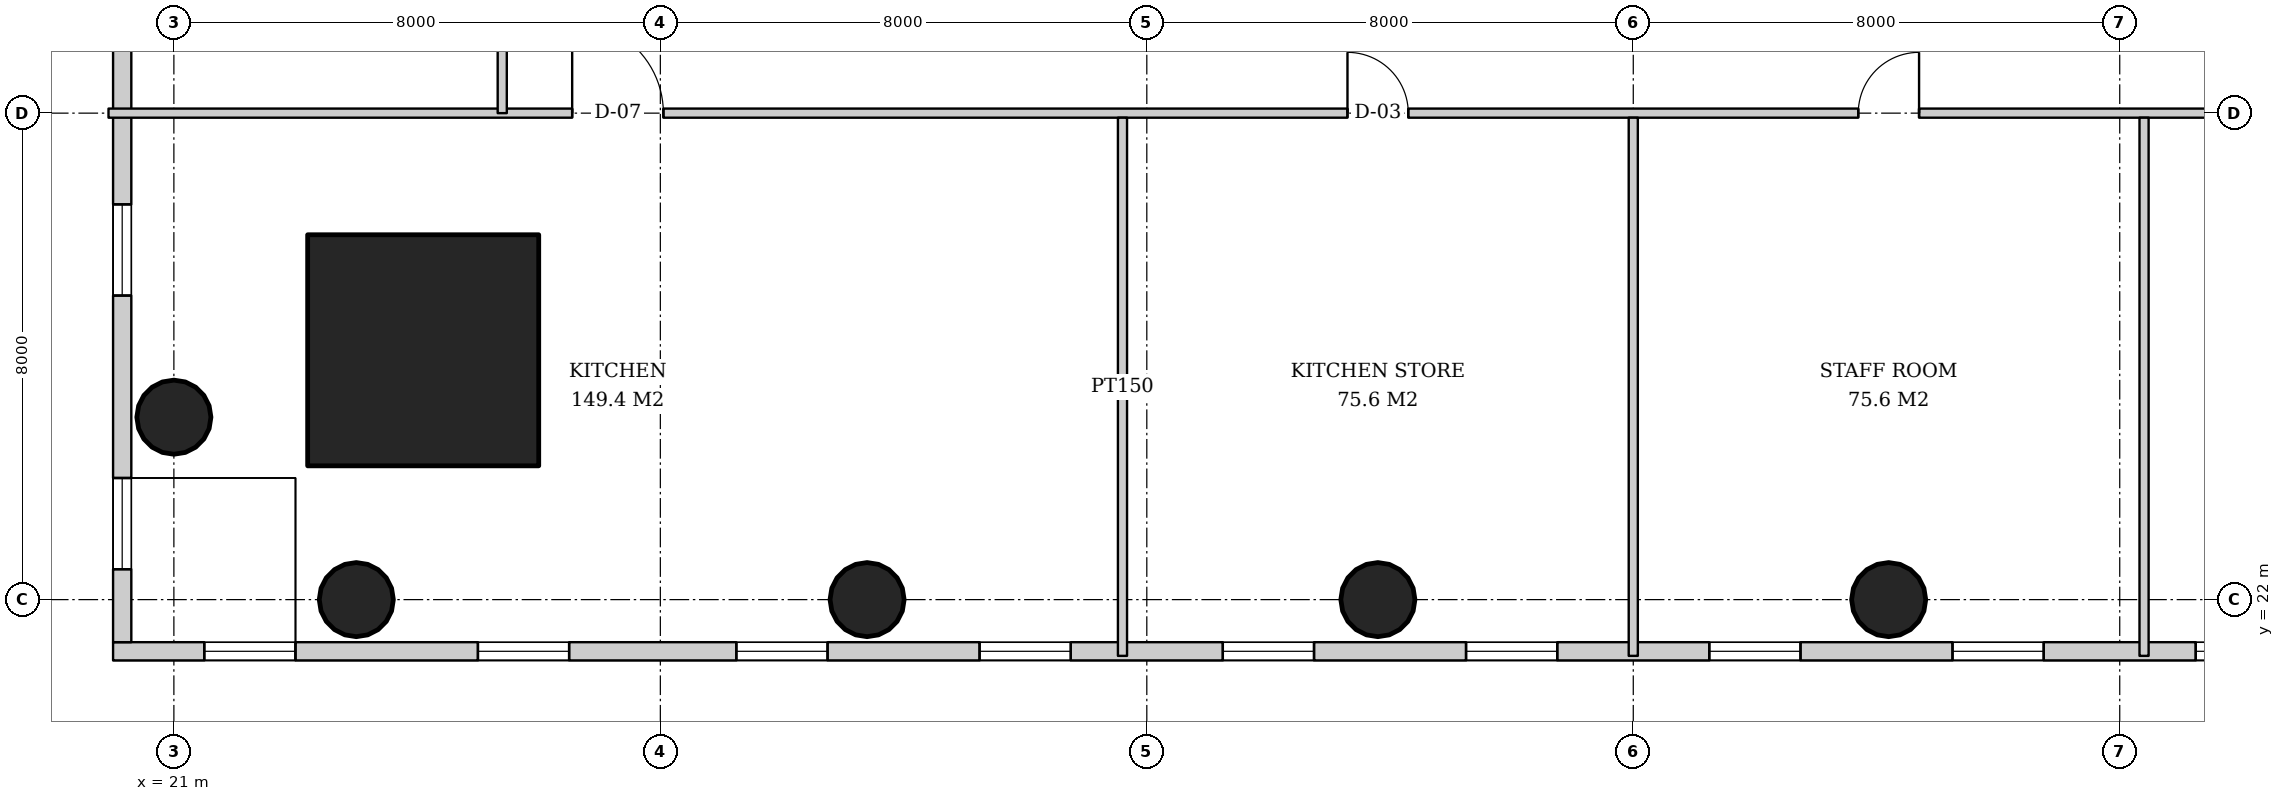
"""IFC4 building model, lengths in metres.
Left out: names, types, materials, properties, quantities, classifications, styles, units other than length and angle.
Written with IfcOpenShell. Run it as: python <this file> out.ifc"""

import sys

from ifc_helpers import new_model, si_unit, direction, frame, frame_2d, origin, origin_2d, place, context, subcontext, project, spatial, rectangle, hollow_circle, extrude, element, fill, save


model = new_model("IFC4")
c1 = context("Model", 3, precision=1e-05, world=origin(), true_north=direction((0.0, 1.0)))
c2 = subcontext(c1, "Body", "Model", "MODEL_VIEW")
j1 = project(units=[si_unit("LENGTHUNIT", "METRE"), si_unit("PLANEANGLEUNIT", "RADIAN")], contexts=[c1])
p1 = place(None, origin())
s1 = spatial("IfcSite", under=j1, at=p1, CompositionType="ELEMENT")
p2 = place(p1, origin())
s2 = spatial("IfcBuilding", under=s1, at=p2, CompositionType="ELEMENT")
p3 = place(p2, frame((0.0, 0.0, 16.0)))
s3 = spatial("IfcBuildingStorey", under=s2, at=p3, CompositionType="ELEMENT", Elevation=16.0)
p4 = place(p3, frame((25.1, 26.1, 0.0), z_axis=(0.0, 0.0, 1.0), x_axis=(1.0, 0.0, 0.0)))
e1 = element("IfcColumn", 1, at=p4, inside=s3, PredefinedType="COLUMN", context=c2, shape_type="SweptSolid", body=[
    extrude(rectangle(XDim=3.8, YDim=3.8, at=origin_2d()), origin(), (0.0, 0.0, 1.0), 5.0),
])
for number, where, z_axis, x_axis in (
    (2, (21.0, 25.0, 0.0), (0.0, 0.0, 1.0), (1.0, 0.0, 0.0)),
    (3, (24.0, 22.0, 0.0), (0.0, 0.0, 1.0), (1.0, 0.0, 0.0)),
    (4, (32.4, 22.0, 0.0), (0.0, 0.0, 1.0), (1.0, 0.0, 0.0)),
    (5, (40.8, 22.0, 0.0), (0.0, 0.0, 1.0), (1.0, 0.0, 0.0)),
    (6, (49.2, 22.0, 0.0), (0.0, 0.0, 1.0), (1.0, 0.0, 0.0)),
):
    element("IfcColumn", number, at=place(p3, frame(where, z_axis=z_axis, x_axis=x_axis)), inside=s3, PredefinedType="COLUMN", context=c2, shape_type="SweptSolid", body=[
        extrude(hollow_circle(Radius=0.61, WallThickness=0.04, at=origin_2d()), origin(), (0.0, 0.0, 1.0), 5.0),
    ])
p5 = place(p3, frame((20.0, 21.15, 0.0), z_axis=(0.0, 0.0, 1.0), x_axis=(1.0, 0.0, 0.0)))
e7 = element("IfcWall", 7, at=p5, inside=s3, PredefinedType="SOLIDWALL", context=c2, shape_type="SweptSolid", body=[
    extrude(rectangle(XDim=58.0, YDim=0.3, at=frame_2d((29.0, 0.0))), origin(), (0.0, 0.0, 1.0), 4.7),
])
p6 = place(p5, frame((1.5, 0.0, 0.9)))
e8 = element("IfcOpeningElement", 8, at=p6, cuts=e7, PredefinedType="OPENING", context=c2, shape_type="SweptSolid", body=[
    extrude(rectangle(XDim=1.5, YDim=3.2, at=frame_2d((0.75, 1.6))), frame((0.0, 0.16, 0.0), z_axis=(0.0, -1.0, 0.0), x_axis=(1.0, 0.0, 0.0)), (0.0, 0.0, 1.0), 0.32),
])
p7 = place(p5, frame((6.0, 0.0, 0.9)))
e9 = element("IfcOpeningElement", 9, at=p7, cuts=e7, PredefinedType="OPENING", context=c2, shape_type="SweptSolid", body=[
    extrude(rectangle(XDim=1.5, YDim=3.2, at=frame_2d((0.75, 1.6))), frame((0.0, 0.16, 0.0), z_axis=(0.0, -1.0, 0.0), x_axis=(1.0, 0.0, 0.0)), (0.0, 0.0, 1.0), 0.32),
])
p8 = place(p5, frame((10.25, 0.0, 0.9)))
e10 = element("IfcOpeningElement", 10, at=p8, cuts=e7, PredefinedType="OPENING", context=c2, shape_type="SweptSolid", body=[
    extrude(rectangle(XDim=1.5, YDim=3.2, at=frame_2d((0.75, 1.6))), frame((0.0, 0.16, 0.0), z_axis=(0.0, -1.0, 0.0), x_axis=(1.0, 0.0, 0.0)), (0.0, 0.0, 1.0), 0.32),
])
p9 = place(p5, frame((14.25, 0.0, 0.9)))
e11 = element("IfcOpeningElement", 11, at=p9, cuts=e7, PredefinedType="OPENING", context=c2, shape_type="SweptSolid", body=[
    extrude(rectangle(XDim=1.5, YDim=3.2, at=frame_2d((0.75, 1.6))), frame((0.0, 0.16, 0.0), z_axis=(0.0, -1.0, 0.0), x_axis=(1.0, 0.0, 0.0)), (0.0, 0.0, 1.0), 0.32),
])
p10 = place(p5, frame((18.25, 0.0, 0.9)))
e12 = element("IfcOpeningElement", 12, at=p10, cuts=e7, PredefinedType="OPENING", context=c2, shape_type="SweptSolid", body=[
    extrude(rectangle(XDim=1.5, YDim=3.2, at=frame_2d((0.75, 1.6))), frame((0.0, 0.16, 0.0), z_axis=(0.0, -1.0, 0.0), x_axis=(1.0, 0.0, 0.0)), (0.0, 0.0, 1.0), 0.32),
])
p11 = place(p5, frame((22.25, 0.0, 0.9)))
e13 = element("IfcOpeningElement", 13, at=p11, cuts=e7, PredefinedType="OPENING", context=c2, shape_type="SweptSolid", body=[
    extrude(rectangle(XDim=1.5, YDim=3.2, at=frame_2d((0.75, 1.6))), frame((0.0, 0.16, 0.0), z_axis=(0.0, -1.0, 0.0), x_axis=(1.0, 0.0, 0.0)), (0.0, 0.0, 1.0), 0.32),
])
p12 = place(p5, frame((26.25, 0.0, 0.9)))
e14 = element("IfcOpeningElement", 14, at=p12, cuts=e7, PredefinedType="OPENING", context=c2, shape_type="SweptSolid", body=[
    extrude(rectangle(XDim=1.5, YDim=3.2, at=frame_2d((0.75, 1.6))), frame((0.0, 0.16, 0.0), z_axis=(0.0, -1.0, 0.0), x_axis=(1.0, 0.0, 0.0)), (0.0, 0.0, 1.0), 0.32),
])
p13 = place(p5, frame((30.25, 0.0, 0.9)))
e15 = element("IfcOpeningElement", 15, at=p13, cuts=e7, PredefinedType="OPENING", context=c2, shape_type="SweptSolid", body=[
    extrude(rectangle(XDim=1.5, YDim=3.2, at=frame_2d((0.75, 1.6))), frame((0.0, 0.16, 0.0), z_axis=(0.0, -1.0, 0.0), x_axis=(1.0, 0.0, 0.0)), (0.0, 0.0, 1.0), 0.32),
])
p14 = place(p5, frame((34.25, 0.0, 0.9)))
e16 = element("IfcOpeningElement", 16, at=p14, cuts=e7, PredefinedType="OPENING", context=c2, shape_type="SweptSolid", body=[
    extrude(rectangle(XDim=1.5, YDim=3.2, at=frame_2d((0.75, 1.6))), frame((0.0, 0.16, 0.0), z_axis=(0.0, -1.0, 0.0), x_axis=(1.0, 0.0, 0.0)), (0.0, 0.0, 1.0), 0.32),
])
p15 = place(p5, frame((38.25, 0.0, 0.9)))
e17 = element("IfcOpeningElement", 17, at=p15, cuts=e7, PredefinedType="OPENING", context=c2, shape_type="SweptSolid", body=[
    extrude(rectangle(XDim=1.5, YDim=3.2, at=frame_2d((0.75, 1.6))), frame((0.0, 0.16, 0.0), z_axis=(0.0, -1.0, 0.0), x_axis=(1.0, 0.0, 0.0)), (0.0, 0.0, 1.0), 0.32),
])
p16 = place(p5, frame((42.25, 0.0, 0.9)))
e18 = element("IfcOpeningElement", 18, at=p16, cuts=e7, PredefinedType="OPENING", context=c2, shape_type="SweptSolid", body=[
    extrude(rectangle(XDim=1.5, YDim=3.2, at=frame_2d((0.75, 1.6))), frame((0.0, 0.16, 0.0), z_axis=(0.0, -1.0, 0.0), x_axis=(1.0, 0.0, 0.0)), (0.0, 0.0, 1.0), 0.32),
])
p17 = place(p5, frame((46.25, 0.0, 0.9)))
e19 = element("IfcOpeningElement", 19, at=p17, cuts=e7, PredefinedType="OPENING", context=c2, shape_type="SweptSolid", body=[
    extrude(rectangle(XDim=1.5, YDim=3.2, at=frame_2d((0.75, 1.6))), frame((0.0, 0.16, 0.0), z_axis=(0.0, -1.0, 0.0), x_axis=(1.0, 0.0, 0.0)), (0.0, 0.0, 1.0), 0.32),
])
p18 = place(p5, frame((50.5, 0.0, 0.9)))
e20 = element("IfcOpeningElement", 20, at=p18, cuts=e7, PredefinedType="OPENING", context=c2, shape_type="SweptSolid", body=[
    extrude(rectangle(XDim=1.5, YDim=3.2, at=frame_2d((0.75, 1.6))), frame((0.0, 0.16, 0.0), z_axis=(0.0, -1.0, 0.0), x_axis=(1.0, 0.0, 0.0)), (0.0, 0.0, 1.0), 0.32),
])
p19 = place(p5, frame((55.0, 0.0, 0.9)))
e21 = element("IfcOpeningElement", 21, at=p19, cuts=e7, PredefinedType="OPENING", context=c2, shape_type="SweptSolid", body=[
    extrude(rectangle(XDim=1.5, YDim=3.2, at=frame_2d((0.75, 1.6))), frame((0.0, 0.16, 0.0), z_axis=(0.0, -1.0, 0.0), x_axis=(1.0, 0.0, 0.0)), (0.0, 0.0, 1.0), 0.32),
])
p20 = place(p3, frame((20.15, 70.7, 0.0), z_axis=(0.0, 0.0, 1.0), x_axis=(0.0, -1.0, 0.0)))
e22 = element("IfcWall", 22, at=p20, inside=s3, PredefinedType="SOLIDWALL", context=c2, shape_type="SweptSolid", body=[
    extrude(rectangle(XDim=49.4, YDim=0.3, at=frame_2d((24.7, 0.0))), origin(), (0.0, 0.0, 1.0), 4.7),
])
p21 = place(p20, frame((1.2, 0.0, 0.9)))
e23 = element("IfcOpeningElement", 23, at=p21, cuts=e22, PredefinedType="OPENING", context=c2, shape_type="SweptSolid", body=[
    extrude(rectangle(XDim=1.5, YDim=3.2, at=frame_2d((0.75, 1.6))), frame((0.0, 0.16, 0.0), z_axis=(0.0, -1.0, 0.0), x_axis=(1.0, 0.0, 0.0)), (0.0, 0.0, 1.0), 0.32),
])
p22 = place(p20, frame((5.7, 0.0, 0.9)))
e24 = element("IfcOpeningElement", 24, at=p22, cuts=e22, PredefinedType="OPENING", context=c2, shape_type="SweptSolid", body=[
    extrude(rectangle(XDim=1.5, YDim=3.2, at=frame_2d((0.75, 1.6))), frame((0.0, 0.16, 0.0), z_axis=(0.0, -1.0, 0.0), x_axis=(1.0, 0.0, 0.0)), (0.0, 0.0, 1.0), 0.32),
])
p23 = place(p20, frame((9.95, 0.0, 0.9)))
e25 = element("IfcOpeningElement", 25, at=p23, cuts=e22, PredefinedType="OPENING", context=c2, shape_type="SweptSolid", body=[
    extrude(rectangle(XDim=1.5, YDim=3.2, at=frame_2d((0.75, 1.6))), frame((0.0, 0.16, 0.0), z_axis=(0.0, -1.0, 0.0), x_axis=(1.0, 0.0, 0.0)), (0.0, 0.0, 1.0), 0.32),
])
p24 = place(p20, frame((13.95, 0.0, 0.9)))
e26 = element("IfcOpeningElement", 26, at=p24, cuts=e22, PredefinedType="OPENING", context=c2, shape_type="SweptSolid", body=[
    extrude(rectangle(XDim=1.5, YDim=3.2, at=frame_2d((0.75, 1.6))), frame((0.0, 0.16, 0.0), z_axis=(0.0, -1.0, 0.0), x_axis=(1.0, 0.0, 0.0)), (0.0, 0.0, 1.0), 0.32),
])
p25 = place(p20, frame((17.95, 0.0, 0.9)))
e27 = element("IfcOpeningElement", 27, at=p25, cuts=e22, PredefinedType="OPENING", context=c2, shape_type="SweptSolid", body=[
    extrude(rectangle(XDim=1.5, YDim=3.2, at=frame_2d((0.75, 1.6))), frame((0.0, 0.16, 0.0), z_axis=(0.0, -1.0, 0.0), x_axis=(1.0, 0.0, 0.0)), (0.0, 0.0, 1.0), 0.32),
])
p26 = place(p20, frame((21.95, 0.0, 0.9)))
e28 = element("IfcOpeningElement", 28, at=p26, cuts=e22, PredefinedType="OPENING", context=c2, shape_type="SweptSolid", body=[
    extrude(rectangle(XDim=1.5, YDim=3.2, at=frame_2d((0.75, 1.6))), frame((0.0, 0.16, 0.0), z_axis=(0.0, -1.0, 0.0), x_axis=(1.0, 0.0, 0.0)), (0.0, 0.0, 1.0), 0.32),
])
p27 = place(p20, frame((25.95, 0.0, 0.9)))
e29 = element("IfcOpeningElement", 29, at=p27, cuts=e22, PredefinedType="OPENING", context=c2, shape_type="SweptSolid", body=[
    extrude(rectangle(XDim=1.5, YDim=3.2, at=frame_2d((0.75, 1.6))), frame((0.0, 0.16, 0.0), z_axis=(0.0, -1.0, 0.0), x_axis=(1.0, 0.0, 0.0)), (0.0, 0.0, 1.0), 0.32),
])
p28 = place(p20, frame((29.95, 0.0, 0.9)))
e30 = element("IfcOpeningElement", 30, at=p28, cuts=e22, PredefinedType="OPENING", context=c2, shape_type="SweptSolid", body=[
    extrude(rectangle(XDim=1.5, YDim=3.2, at=frame_2d((0.75, 1.6))), frame((0.0, 0.16, 0.0), z_axis=(0.0, -1.0, 0.0), x_axis=(1.0, 0.0, 0.0)), (0.0, 0.0, 1.0), 0.32),
])
p29 = place(p20, frame((33.95, 0.0, 0.9)))
e31 = element("IfcOpeningElement", 31, at=p29, cuts=e22, PredefinedType="OPENING", context=c2, shape_type="SweptSolid", body=[
    extrude(rectangle(XDim=1.5, YDim=3.2, at=frame_2d((0.75, 1.6))), frame((0.0, 0.16, 0.0), z_axis=(0.0, -1.0, 0.0), x_axis=(1.0, 0.0, 0.0)), (0.0, 0.0, 1.0), 0.32),
])
p30 = place(p20, frame((37.95, 0.0, 0.9)))
e32 = element("IfcOpeningElement", 32, at=p30, cuts=e22, PredefinedType="OPENING", context=c2, shape_type="SweptSolid", body=[
    extrude(rectangle(XDim=1.5, YDim=3.2, at=frame_2d((0.75, 1.6))), frame((0.0, 0.16, 0.0), z_axis=(0.0, -1.0, 0.0), x_axis=(1.0, 0.0, 0.0)), (0.0, 0.0, 1.0), 0.32),
])
p31 = place(p20, frame((42.2, 0.0, 0.9)))
e33 = element("IfcOpeningElement", 33, at=p31, cuts=e22, PredefinedType="OPENING", context=c2, shape_type="SweptSolid", body=[
    extrude(rectangle(XDim=1.5, YDim=3.2, at=frame_2d((0.75, 1.6))), frame((0.0, 0.16, 0.0), z_axis=(0.0, -1.0, 0.0), x_axis=(1.0, 0.0, 0.0)), (0.0, 0.0, 1.0), 0.32),
])
p32 = place(p20, frame((46.7, 0.0, 0.9)))
e34 = element("IfcOpeningElement", 34, at=p32, cuts=e22, PredefinedType="OPENING", context=c2, shape_type="SweptSolid", body=[
    extrude(rectangle(XDim=1.5, YDim=3.2, at=frame_2d((0.75, 1.6))), frame((0.0, 0.16, 0.0), z_axis=(0.0, -1.0, 0.0), x_axis=(1.0, 0.0, 0.0)), (0.0, 0.0, 1.0), 0.32),
])
p33 = place(p3, frame((19.925, 30.0, 0.0), z_axis=(0.0, 0.0, 1.0), x_axis=(1.0, 0.0, 0.0)))
e35 = element("IfcWall", 35, at=p33, inside=s3, PredefinedType="PARTITIONING", context=c2, shape_type="SweptSolid", body=[
    extrude(rectangle(XDim=50.15, YDim=0.15, at=frame_2d((25.075, 0.0))), origin(), (0.0, 0.0, 1.0), 3.688),
])
p34 = place(p33, frame((7.625, 0.0, 0.0)))
e36 = element("IfcOpeningElement", 36, at=p34, cuts=e35, PredefinedType="OPENING", context=c2, shape_type="SweptSolid", body=[
    extrude(rectangle(XDim=1.5, YDim=2.1, at=frame_2d((0.75, 1.05))), frame((0.0, 0.085, 0.0), z_axis=(0.0, -1.0, 0.0), x_axis=(1.0, 0.0, 0.0)), (0.0, 0.0, 1.0), 0.17),
])
p35 = place(p33, frame((20.375, 0.0, 0.0)))
e37 = element("IfcOpeningElement", 37, at=p35, cuts=e35, PredefinedType="OPENING", context=c2, shape_type="SweptSolid", body=[
    extrude(rectangle(XDim=1.0, YDim=2.1, at=frame_2d((0.5, 1.05))), frame((0.0, 0.085, 0.0), z_axis=(0.0, -1.0, 0.0), x_axis=(1.0, 0.0, 0.0)), (0.0, 0.0, 1.0), 0.17),
])
p36 = place(p33, frame((28.775, 0.0, 0.0)))
e38 = element("IfcOpeningElement", 38, at=p36, cuts=e35, PredefinedType="OPENING", context=c2, shape_type="SweptSolid", body=[
    extrude(rectangle(XDim=1.0, YDim=2.1, at=frame_2d((0.5, 1.05))), frame((0.0, 0.085, 0.0), z_axis=(0.0, -1.0, 0.0), x_axis=(1.0, 0.0, 0.0)), (0.0, 0.0, 1.0), 0.17),
])
p37 = place(p33, frame((39.875, 0.0, 0.0)))
e39 = element("IfcOpeningElement", 39, at=p37, cuts=e35, PredefinedType="OPENING", context=c2, shape_type="SweptSolid", body=[
    extrude(rectangle(XDim=1.0, YDim=2.1, at=frame_2d((0.5, 1.05))), frame((0.0, 0.085, 0.0), z_axis=(0.0, -1.0, 0.0), x_axis=(1.0, 0.0, 0.0)), (0.0, 0.0, 1.0), 0.17),
])
for number, where, z_axis, x_axis in (
    (40, (36.6, 21.075, 0.0), (0.0, 0.0, 1.0), (0.0, 1.0, 0.0)),
    (41, (45.0, 21.075, 0.0), (0.0, 0.0, 1.0), (0.0, 1.0, 0.0)),
    (42, (53.4, 21.075, 0.0), (0.0, 0.0, 1.0), (0.0, 1.0, 0.0)),
):
    element("IfcWall", number, at=place(p3, frame(where, z_axis=z_axis, x_axis=x_axis)), inside=s3, PredefinedType="PARTITIONING", context=c2, shape_type="SweptSolid", body=[
        extrude(rectangle(XDim=8.85, YDim=0.15, at=frame_2d((4.425, 0.0))), origin(), (0.0, 0.0, 1.0), 4.1),
    ])
p38 = place(p3, frame((26.4, 30.0, 0.0), z_axis=(0.0, 0.0, 1.0), x_axis=(0.0, 1.0, 0.0)))
e43 = element("IfcWall", 43, at=p38, inside=s3, PredefinedType="PARTITIONING", context=c2, shape_type="SweptSolid", body=[
    extrude(rectangle(XDim=32.0, YDim=0.15, at=frame_2d((16.0, 0.0))), origin(), (0.0, 0.0, 1.0), 3.688),
])
p39 = place(p38, frame((7.5, 0.0, 0.0)))
e44 = element("IfcOpeningElement", 44, at=p39, cuts=e43, PredefinedType="OPENING", context=c2, shape_type="SweptSolid", body=[
    extrude(rectangle(XDim=1.0, YDim=2.1, at=frame_2d((0.5, 1.05))), frame((0.0, 0.085, 0.0), z_axis=(0.0, -1.0, 0.0), x_axis=(1.0, 0.0, 0.0)), (0.0, 0.0, 1.0), 0.17),
])
p40 = place(p38, frame((23.5, 0.0, 0.0)))
e45 = element("IfcOpeningElement", 45, at=p40, cuts=e43, PredefinedType="OPENING", context=c2, shape_type="SweptSolid", body=[
    extrude(rectangle(XDim=1.0, YDim=2.1, at=frame_2d((0.5, 1.05))), frame((0.0, 0.085, 0.0), z_axis=(0.0, -1.0, 0.0), x_axis=(1.0, 0.0, 0.0)), (0.0, 0.0, 1.0), 0.17),
])
p41 = place(p6, origin())
e46 = element("IfcWindow", 46, at=p41, inside=s3, PartitioningType="SINGLE_PANEL", PredefinedType="WINDOW", context=c2, shape_type="SweptSolid", body=[
    extrude(rectangle(XDim=1.5, YDim=3.2, at=frame_2d((0.75, 1.6))), frame((0.0, 0.03, 0.0), z_axis=(0.0, -1.0, 0.0), x_axis=(1.0, 0.0, 0.0)), (0.0, 0.0, 1.0), 0.06),
])
fill(e8, e46)
p42 = place(p7, origin())
e47 = element("IfcWindow", 47, at=p42, inside=s3, PartitioningType="SINGLE_PANEL", PredefinedType="WINDOW", context=c2, shape_type="SweptSolid", body=[
    extrude(rectangle(XDim=1.5, YDim=3.2, at=frame_2d((0.75, 1.6))), frame((0.0, 0.03, 0.0), z_axis=(0.0, -1.0, 0.0), x_axis=(1.0, 0.0, 0.0)), (0.0, 0.0, 1.0), 0.06),
])
fill(e9, e47)
p43 = place(p8, origin())
e48 = element("IfcWindow", 48, at=p43, inside=s3, PartitioningType="SINGLE_PANEL", PredefinedType="WINDOW", context=c2, shape_type="SweptSolid", body=[
    extrude(rectangle(XDim=1.5, YDim=3.2, at=frame_2d((0.75, 1.6))), frame((0.0, 0.03, 0.0), z_axis=(0.0, -1.0, 0.0), x_axis=(1.0, 0.0, 0.0)), (0.0, 0.0, 1.0), 0.06),
])
fill(e10, e48)
p44 = place(p9, origin())
e49 = element("IfcWindow", 49, at=p44, inside=s3, PartitioningType="SINGLE_PANEL", PredefinedType="WINDOW", context=c2, shape_type="SweptSolid", body=[
    extrude(rectangle(XDim=1.5, YDim=3.2, at=frame_2d((0.75, 1.6))), frame((0.0, 0.03, 0.0), z_axis=(0.0, -1.0, 0.0), x_axis=(1.0, 0.0, 0.0)), (0.0, 0.0, 1.0), 0.06),
])
fill(e11, e49)
p45 = place(p10, origin())
e50 = element("IfcWindow", 50, at=p45, inside=s3, PartitioningType="SINGLE_PANEL", PredefinedType="WINDOW", context=c2, shape_type="SweptSolid", body=[
    extrude(rectangle(XDim=1.5, YDim=3.2, at=frame_2d((0.75, 1.6))), frame((0.0, 0.03, 0.0), z_axis=(0.0, -1.0, 0.0), x_axis=(1.0, 0.0, 0.0)), (0.0, 0.0, 1.0), 0.06),
])
fill(e12, e50)
p46 = place(p11, origin())
e51 = element("IfcWindow", 51, at=p46, inside=s3, PartitioningType="SINGLE_PANEL", PredefinedType="WINDOW", context=c2, shape_type="SweptSolid", body=[
    extrude(rectangle(XDim=1.5, YDim=3.2, at=frame_2d((0.75, 1.6))), frame((0.0, 0.03, 0.0), z_axis=(0.0, -1.0, 0.0), x_axis=(1.0, 0.0, 0.0)), (0.0, 0.0, 1.0), 0.06),
])
fill(e13, e51)
p47 = place(p12, origin())
e52 = element("IfcWindow", 52, at=p47, inside=s3, PartitioningType="SINGLE_PANEL", PredefinedType="WINDOW", context=c2, shape_type="SweptSolid", body=[
    extrude(rectangle(XDim=1.5, YDim=3.2, at=frame_2d((0.75, 1.6))), frame((0.0, 0.03, 0.0), z_axis=(0.0, -1.0, 0.0), x_axis=(1.0, 0.0, 0.0)), (0.0, 0.0, 1.0), 0.06),
])
fill(e14, e52)
p48 = place(p13, origin())
e53 = element("IfcWindow", 53, at=p48, inside=s3, PartitioningType="SINGLE_PANEL", PredefinedType="WINDOW", context=c2, shape_type="SweptSolid", body=[
    extrude(rectangle(XDim=1.5, YDim=3.2, at=frame_2d((0.75, 1.6))), frame((0.0, 0.03, 0.0), z_axis=(0.0, -1.0, 0.0), x_axis=(1.0, 0.0, 0.0)), (0.0, 0.0, 1.0), 0.06),
])
fill(e15, e53)
p49 = place(p14, origin())
e54 = element("IfcWindow", 54, at=p49, inside=s3, PartitioningType="SINGLE_PANEL", PredefinedType="WINDOW", context=c2, shape_type="SweptSolid", body=[
    extrude(rectangle(XDim=1.5, YDim=3.2, at=frame_2d((0.75, 1.6))), frame((0.0, 0.03, 0.0), z_axis=(0.0, -1.0, 0.0), x_axis=(1.0, 0.0, 0.0)), (0.0, 0.0, 1.0), 0.06),
])
fill(e16, e54)
p50 = place(p31, origin())
e55 = element("IfcWindow", 55, at=p50, inside=s3, PartitioningType="SINGLE_PANEL", PredefinedType="WINDOW", context=c2, shape_type="SweptSolid", body=[
    extrude(rectangle(XDim=1.5, YDim=3.2, at=frame_2d((0.75, 1.6))), frame((0.0, 0.03, 0.0), z_axis=(0.0, -1.0, 0.0), x_axis=(1.0, 0.0, 0.0)), (0.0, 0.0, 1.0), 0.06),
])
fill(e33, e55)
p51 = place(p32, origin())
e56 = element("IfcWindow", 56, at=p51, inside=s3, PartitioningType="SINGLE_PANEL", PredefinedType="WINDOW", context=c2, shape_type="SweptSolid", body=[
    extrude(rectangle(XDim=1.5, YDim=3.2, at=frame_2d((0.75, 1.6))), frame((0.0, 0.03, 0.0), z_axis=(0.0, -1.0, 0.0), x_axis=(1.0, 0.0, 0.0)), (0.0, 0.0, 1.0), 0.06),
])
fill(e34, e56)
p52 = place(p34, origin())
e57 = element("IfcDoor", 57, at=p52, inside=s3, OperationType="DOUBLE_DOOR_DOUBLE_SWING", PredefinedType="DOOR", context=c2, shape_type="SweptSolid", body=[
    extrude(rectangle(XDim=1.5, YDim=2.1, at=frame_2d((0.75, 1.05))), frame((0.0, 0.025, 0.0), z_axis=(0.0, -1.0, 0.0), x_axis=(1.0, 0.0, 0.0)), (0.0, 0.0, 1.0), 0.05),
])
fill(e36, e57)
p53 = place(p35, origin())
e58 = element("IfcDoor", 58, at=p53, inside=s3, OperationType="SINGLE_SWING_LEFT", PredefinedType="DOOR", context=c2, shape_type="SweptSolid", body=[
    extrude(rectangle(XDim=1.0, YDim=2.1, at=frame_2d((0.5, 1.05))), frame((0.0, 0.025, 0.0), z_axis=(0.0, -1.0, 0.0), x_axis=(1.0, 0.0, 0.0)), (0.0, 0.0, 1.0), 0.05),
])
fill(e37, e58)
p54 = place(p36, origin())
e59 = element("IfcDoor", 59, at=p54, inside=s3, OperationType="SINGLE_SWING_RIGHT", PredefinedType="DOOR", context=c2, shape_type="SweptSolid", body=[
    extrude(rectangle(XDim=1.0, YDim=2.1, at=frame_2d((0.5, 1.05))), frame((0.0, 0.025, 0.0), z_axis=(0.0, -1.0, 0.0), x_axis=(1.0, 0.0, 0.0)), (0.0, 0.0, 1.0), 0.05),
])
fill(e38, e59)
save(model, sys.argv[1])
